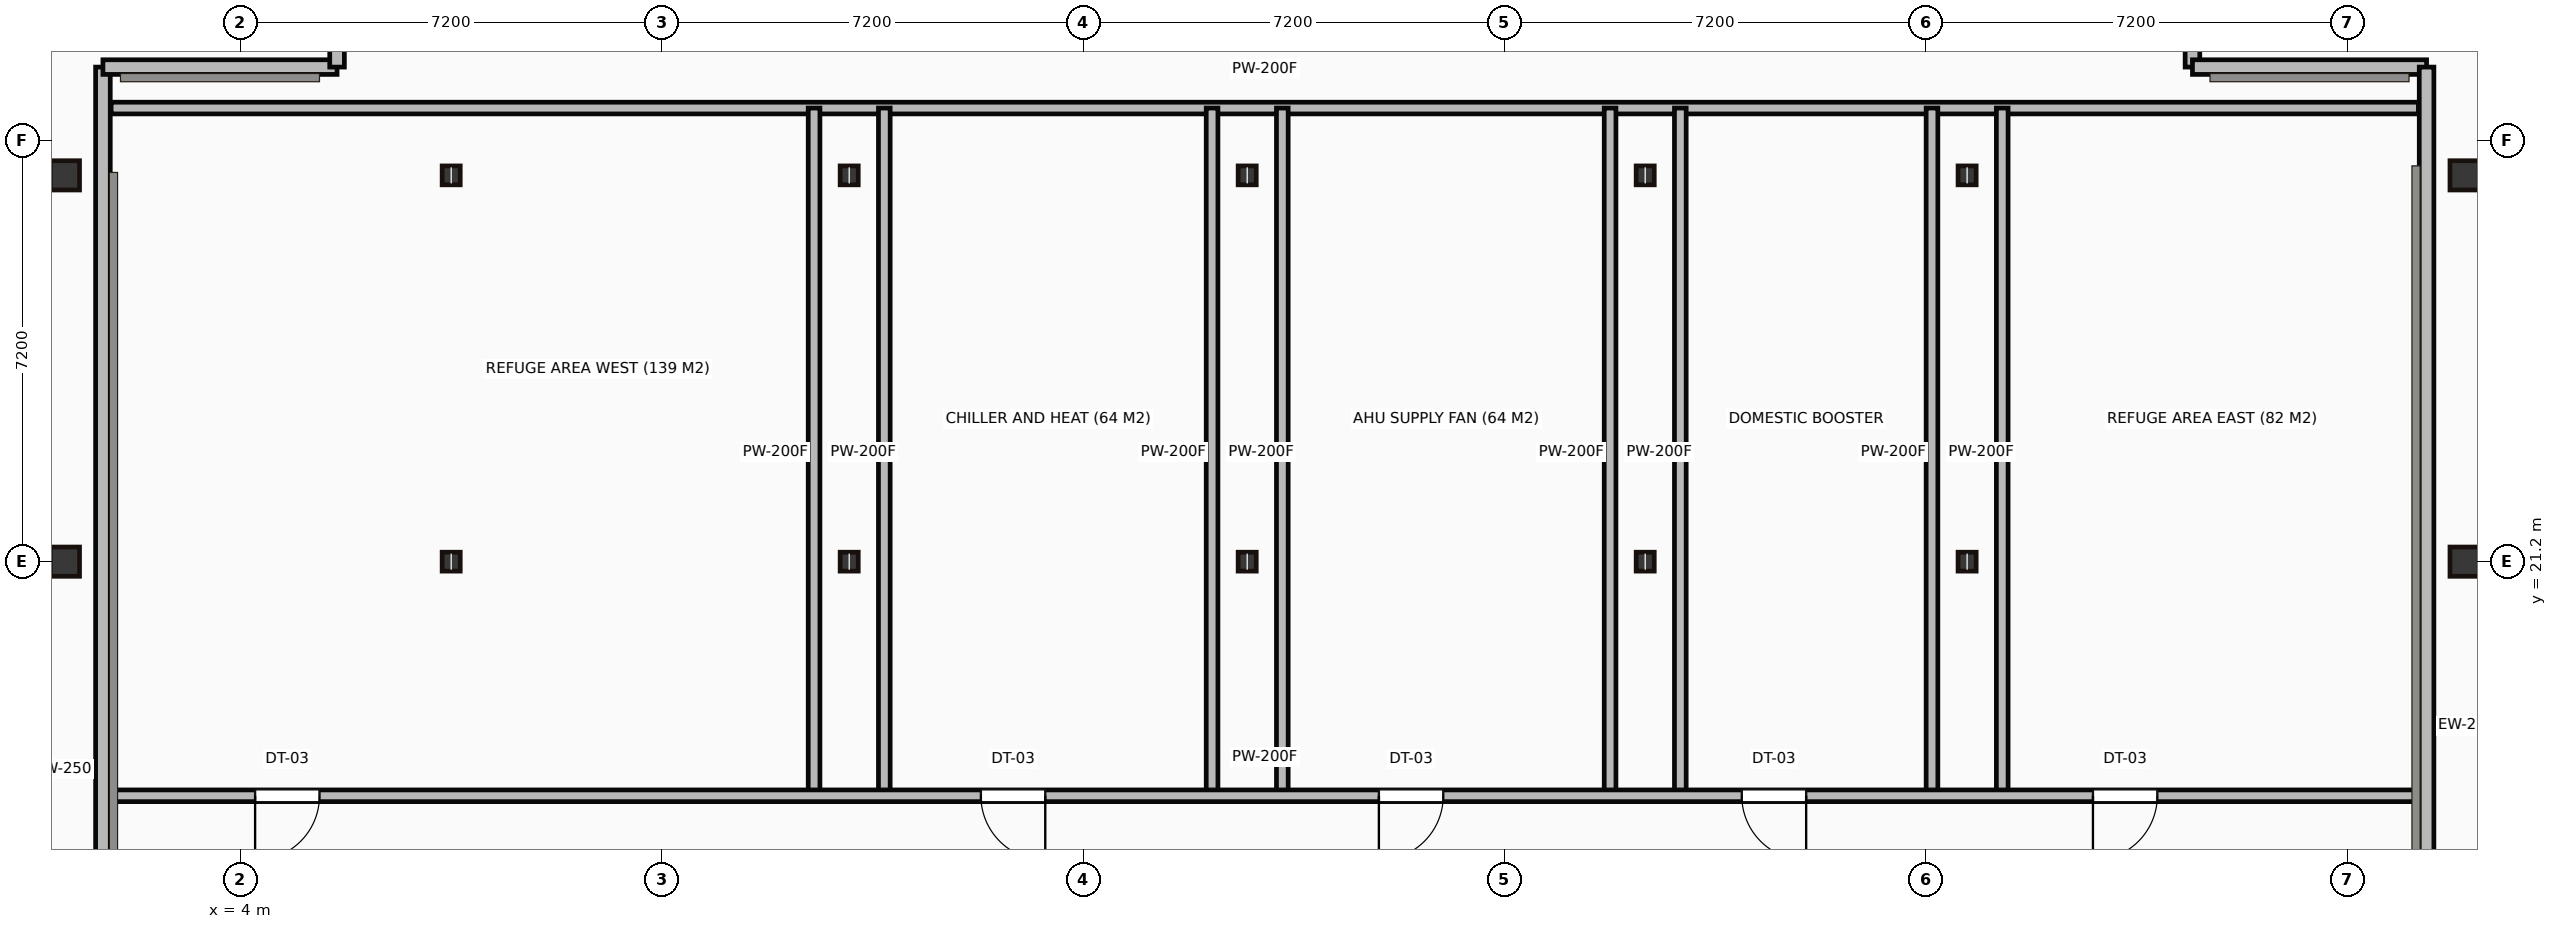
"""IFC4 building model, lengths in metres.
Left out: names, types, materials, properties, quantities, classifications, styles, units other than length and angle.
Written with IfcOpenShell. Run it as: python <this file> out.ifc"""

import sys

from ifc_helpers import new_model, si_unit, direction, frame, frame_2d, origin, origin_2d, place, context, subcontext, project, spatial, rectangle, hollow_rectangle, i_section, extrude, source, transform, mapped, element, fill, save


model = new_model("IFC4")
c1 = context("Model", 3, precision=1e-05, world=origin(), true_north=direction((0.0, 1.0)))
c2 = subcontext(c1, "Body", "Model", "MODEL_VIEW")
j1 = project(units=[si_unit("LENGTHUNIT", "METRE"), si_unit("PLANEANGLEUNIT", "RADIAN")], contexts=[c1])
p1 = place(None, origin())
s1 = spatial("IfcSite", under=j1, at=p1, CompositionType="ELEMENT")
p2 = place(p1, origin())
s2 = spatial("IfcBuilding", under=s1, at=p2, CompositionType="ELEMENT")
p3 = place(p2, frame((0.0, 0.0, 236.05)))
s3 = spatial("IfcBuildingStorey", under=s2, at=p3, CompositionType="ELEMENT", Elevation=236.05)
m1 = source(origin(), c2, "Body", "SweptSolid", [
    extrude(hollow_rectangle(XDim=0.5, YDim=0.5, WallThickness=0.022, at=origin_2d()), origin(), (0.0, 0.0, 1.0), 4.5),
])
for number, where, z_axis, x_axis in (
    (1, (1.0, 21.2, 0.0), (0.0, 0.0, 1.0), (1.0, 0.0, 0.0)),
    (2, (1.0, 27.8, 0.0), (0.0, 0.0, 1.0), (1.0, 0.0, 0.0)),
):
    element("IfcColumn", number, at=place(p3, frame(where, z_axis=z_axis, x_axis=x_axis)), inside=s3, PredefinedType="COLUMN", context=c2, shape_type="MappedRepresentation", body=[
        mapped(m1, transform((0.0, 0.0, 0.0))),
    ])
m2 = source(origin(), c2, "Body", "SweptSolid", [
    extrude(i_section(OverallWidth=0.309, OverallDepth=0.323, WebThickness=0.014, FlangeThickness=0.023, at=origin_2d()), origin(), (0.0, 0.0, 1.0), 4.5),
])
for number, where, z_axis, x_axis in (
    (3, (7.6, 21.2, 0.0), (0.0, 0.0, 1.0), (1.0, 0.0, 0.0)),
    (4, (7.6, 27.8, 0.0), (0.0, 0.0, 1.0), (1.0, 0.0, 0.0)),
    (5, (14.4, 21.2, 0.0), (0.0, 0.0, 1.0), (1.0, 0.0, 0.0)),
    (6, (14.4, 27.8, 0.0), (0.0, 0.0, 1.0), (1.0, 0.0, 0.0)),
    (7, (21.2, 21.2, 0.0), (0.0, 0.0, 1.0), (1.0, 0.0, 0.0)),
    (8, (21.2, 27.8, 0.0), (0.0, 0.0, 1.0), (1.0, 0.0, 0.0)),
    (9, (28.0, 21.2, 0.0), (0.0, 0.0, 1.0), (1.0, 0.0, 0.0)),
    (10, (28.0, 27.8, 0.0), (0.0, 0.0, 1.0), (1.0, 0.0, 0.0)),
    (11, (33.5, 21.2, 0.0), (0.0, 0.0, 1.0), (1.0, 0.0, 0.0)),
    (12, (33.5, 27.8, 0.0), (0.0, 0.0, 1.0), (1.0, 0.0, 0.0)),
):
    element("IfcColumn", number, at=place(p3, frame(where, z_axis=z_axis, x_axis=x_axis)), inside=s3, PredefinedType="COLUMN", context=c2, shape_type="MappedRepresentation", body=[
        mapped(m2, transform((0.0, 0.0, 0.0))),
    ])
for number, where, z_axis, x_axis in (
    (13, (42.0, 21.2, 0.0), (0.0, 0.0, 1.0), (1.0, 0.0, 0.0)),
    (14, (42.0, 27.8, 0.0), (0.0, 0.0, 1.0), (1.0, 0.0, 0.0)),
):
    element("IfcColumn", number, at=place(p3, frame(where, z_axis=z_axis, x_axis=x_axis)), inside=s3, PredefinedType="COLUMN", context=c2, shape_type="MappedRepresentation", body=[
        mapped(m1, transform((0.0, 0.0, 0.0))),
    ])
m3 = source(origin(), c2, "Body", "SweptSolid", [
    extrude(rectangle(XDim=24.0, YDim=0.25, at=frame_2d((12.0, 0.0))), origin(), (0.0, 0.0, 1.0), 4.25),
])
p4 = place(p3, frame((1.65, 5.65, 0.0), z_axis=(0.0, 0.0, 1.0), x_axis=(0.0, 1.0, 0.0)))
e15 = element("IfcWall", 15, at=p4, inside=s3, PredefinedType="STANDARD", context=c2, shape_type="MappedRepresentation", body=[
    mapped(m3, transform((0.0, 0.0, 0.0))),
])
m4 = source(origin(), c2, "Body", "SweptSolid", [
    extrude(rectangle(XDim=4.0, YDim=0.25, at=frame_2d((2.0, 0.0))), origin(), (0.0, 0.0, 1.0), 4.25),
])
for number, where, z_axis, x_axis in (
    (16, (1.65, 29.65, 0.0), (0.0, 0.0, 1.0), (1.0, 0.0, 0.0)),
    (17, (5.65, 29.65, 0.0), (0.0, 0.0, 1.0), (0.0, 1.0, 0.0)),
    (18, (37.35, 33.65, 0.0), (0.0, 0.0, 1.0), (0.0, -1.0, 0.0)),
    (19, (37.35, 29.65, 0.0), (0.0, 0.0, 1.0), (1.0, 0.0, 0.0)),
):
    element("IfcWall", number, at=place(p3, frame(where, z_axis=z_axis, x_axis=x_axis)), inside=s3, PredefinedType="STANDARD", context=c2, shape_type="MappedRepresentation", body=[
        mapped(m4, transform((0.0, 0.0, 0.0))),
    ])
m5 = source(origin(), c2, "Body", "SweptSolid", [
    extrude(rectangle(XDim=22.5, YDim=0.25, at=frame_2d((11.25, 0.0))), origin(), (0.0, 0.0, 1.0), 4.25),
])
p5 = place(p3, frame((41.35, 29.65, 0.0), z_axis=(0.0, 0.0, 1.0), x_axis=(0.0, -1.0, 0.0)))
e20 = element("IfcWall", 20, at=p5, inside=s3, PredefinedType="STANDARD", context=c2, shape_type="MappedRepresentation", body=[
    mapped(m5, transform((0.0, 0.0, 0.0))),
])
m6 = source(origin(), c2, "Body", "SweptSolid", [
    extrude(rectangle(XDim=39.42, YDim=0.2, at=frame_2d((19.71, 0.0))), origin(), (0.0, 0.0, 1.0), 4.25),
])
p6 = place(p3, frame((1.79, 17.2, 0.0), z_axis=(0.0, 0.0, 1.0), x_axis=(1.0, 0.0, 0.0)))
e21 = element("IfcWall", 21, at=p6, inside=s3, PredefinedType="PARTITIONING", context=c2, shape_type="MappedRepresentation", body=[
    mapped(m6, transform((0.0, 0.0, 0.0))),
])
p7 = place(p6, frame((2.46, 0.0, 0.0)))
e22 = element("IfcOpeningElement", 22, at=p7, cuts=e21, PredefinedType="OPENING", context=c2, shape_type="SweptSolid", body=[
    extrude(rectangle(XDim=1.1, YDim=2.15, at=frame_2d((0.55, 1.075))), frame((0.0, 0.11, 0.0), z_axis=(0.0, -1.0, 0.0), x_axis=(1.0, 0.0, 0.0)), (0.0, 0.0, 1.0), 0.22),
])
p8 = place(p6, frame((14.86, 0.0, 0.0)))
e23 = element("IfcOpeningElement", 23, at=p8, cuts=e21, PredefinedType="OPENING", context=c2, shape_type="SweptSolid", body=[
    extrude(rectangle(XDim=1.1, YDim=2.15, at=frame_2d((0.55, 1.075))), frame((0.0, 0.11, 0.0), z_axis=(0.0, -1.0, 0.0), x_axis=(1.0, 0.0, 0.0)), (0.0, 0.0, 1.0), 0.22),
])
p9 = place(p6, frame((21.66, 0.0, 0.0)))
e24 = element("IfcOpeningElement", 24, at=p9, cuts=e21, PredefinedType="OPENING", context=c2, shape_type="SweptSolid", body=[
    extrude(rectangle(XDim=1.1, YDim=2.15, at=frame_2d((0.55, 1.075))), frame((0.0, 0.11, 0.0), z_axis=(0.0, -1.0, 0.0), x_axis=(1.0, 0.0, 0.0)), (0.0, 0.0, 1.0), 0.22),
])
p10 = place(p6, frame((27.86, 0.0, 0.0)))
e25 = element("IfcOpeningElement", 25, at=p10, cuts=e21, PredefinedType="OPENING", context=c2, shape_type="SweptSolid", body=[
    extrude(rectangle(XDim=1.1, YDim=2.15, at=frame_2d((0.55, 1.075))), frame((0.0, 0.11, 0.0), z_axis=(0.0, -1.0, 0.0), x_axis=(1.0, 0.0, 0.0)), (0.0, 0.0, 1.0), 0.22),
])
p11 = place(p6, frame((33.86, 0.0, 0.0)))
e26 = element("IfcOpeningElement", 26, at=p11, cuts=e21, PredefinedType="OPENING", context=c2, shape_type="SweptSolid", body=[
    extrude(rectangle(XDim=1.1, YDim=2.15, at=frame_2d((0.55, 1.075))), frame((0.0, 0.11, 0.0), z_axis=(0.0, -1.0, 0.0), x_axis=(1.0, 0.0, 0.0)), (0.0, 0.0, 1.0), 0.22),
])
p12 = place(p3, frame((1.79, 28.95, 0.0), z_axis=(0.0, 0.0, 1.0), x_axis=(1.0, 0.0, 0.0)))
e27 = element("IfcWall", 27, at=p12, inside=s3, PredefinedType="PARTITIONING", context=c2, shape_type="MappedRepresentation", body=[
    mapped(m6, transform((0.0, 0.0, 0.0))),
])
m7 = source(origin(), c2, "Body", "SweptSolid", [
    extrude(rectangle(XDim=11.75, YDim=0.2, at=frame_2d((5.875, 0.0))), origin(), (0.0, 0.0, 1.0), 4.25),
])
for number, where, z_axis, x_axis in (
    (28, (13.8, 17.2, 0.0), (0.0, 0.0, 1.0), (0.0, 1.0, 0.0)),
    (29, (15.0, 17.2, 0.0), (0.0, 0.0, 1.0), (0.0, 1.0, 0.0)),
    (30, (20.6, 17.2, 0.0), (0.0, 0.0, 1.0), (0.0, 1.0, 0.0)),
    (31, (21.8, 17.2, 0.0), (0.0, 0.0, 1.0), (0.0, 1.0, 0.0)),
    (32, (27.4, 17.2, 0.0), (0.0, 0.0, 1.0), (0.0, 1.0, 0.0)),
    (33, (28.6, 17.2, 0.0), (0.0, 0.0, 1.0), (0.0, 1.0, 0.0)),
    (34, (32.9, 17.2, 0.0), (0.0, 0.0, 1.0), (0.0, 1.0, 0.0)),
    (35, (34.1, 17.2, 0.0), (0.0, 0.0, 1.0), (0.0, 1.0, 0.0)),
):
    element("IfcWall", number, at=place(p3, frame(where, z_axis=z_axis, x_axis=x_axis)), inside=s3, PredefinedType="PARTITIONING", context=c2, shape_type="MappedRepresentation", body=[
        mapped(m7, transform((0.0, 0.0, 0.0))),
    ])
m8 = source(origin(), c2, "Body", "SweptSolid", [
    extrude(rectangle(XDim=1.1, YDim=2.15, at=frame_2d((0.55, 1.075))), frame((0.0, 0.025, 0.0), z_axis=(0.0, -1.0, 0.0), x_axis=(1.0, 0.0, 0.0)), (0.0, 0.0, 1.0), 0.05),
])
p13 = place(p7, origin())
e36 = element("IfcDoor", 36, at=p13, inside=s3, OperationType="SINGLE_SWING_LEFT", PredefinedType="DOOR", context=c2, shape_type="MappedRepresentation", body=[
    mapped(m8, transform((0.0, 0.0, 0.0))),
])
fill(e22, e36)
p14 = place(p8, origin())
e37 = element("IfcDoor", 37, at=p14, inside=s3, OperationType="SINGLE_SWING_RIGHT", PredefinedType="DOOR", context=c2, shape_type="MappedRepresentation", body=[
    mapped(m8, transform((0.0, 0.0, 0.0))),
])
fill(e23, e37)
p15 = place(p9, origin())
e38 = element("IfcDoor", 38, at=p15, inside=s3, OperationType="SINGLE_SWING_LEFT", PredefinedType="DOOR", context=c2, shape_type="MappedRepresentation", body=[
    mapped(m8, transform((0.0, 0.0, 0.0))),
])
fill(e24, e38)
p16 = place(p10, origin())
e39 = element("IfcDoor", 39, at=p16, inside=s3, OperationType="SINGLE_SWING_RIGHT", PredefinedType="DOOR", context=c2, shape_type="MappedRepresentation", body=[
    mapped(m8, transform((0.0, 0.0, 0.0))),
])
fill(e25, e39)
p17 = place(p11, origin())
e40 = element("IfcDoor", 40, at=p17, inside=s3, OperationType="SINGLE_SWING_LEFT", PredefinedType="DOOR", context=c2, shape_type="MappedRepresentation", body=[
    mapped(m8, transform((0.0, 0.0, 0.0))),
])
fill(e26, e40)
save(model, sys.argv[1])
